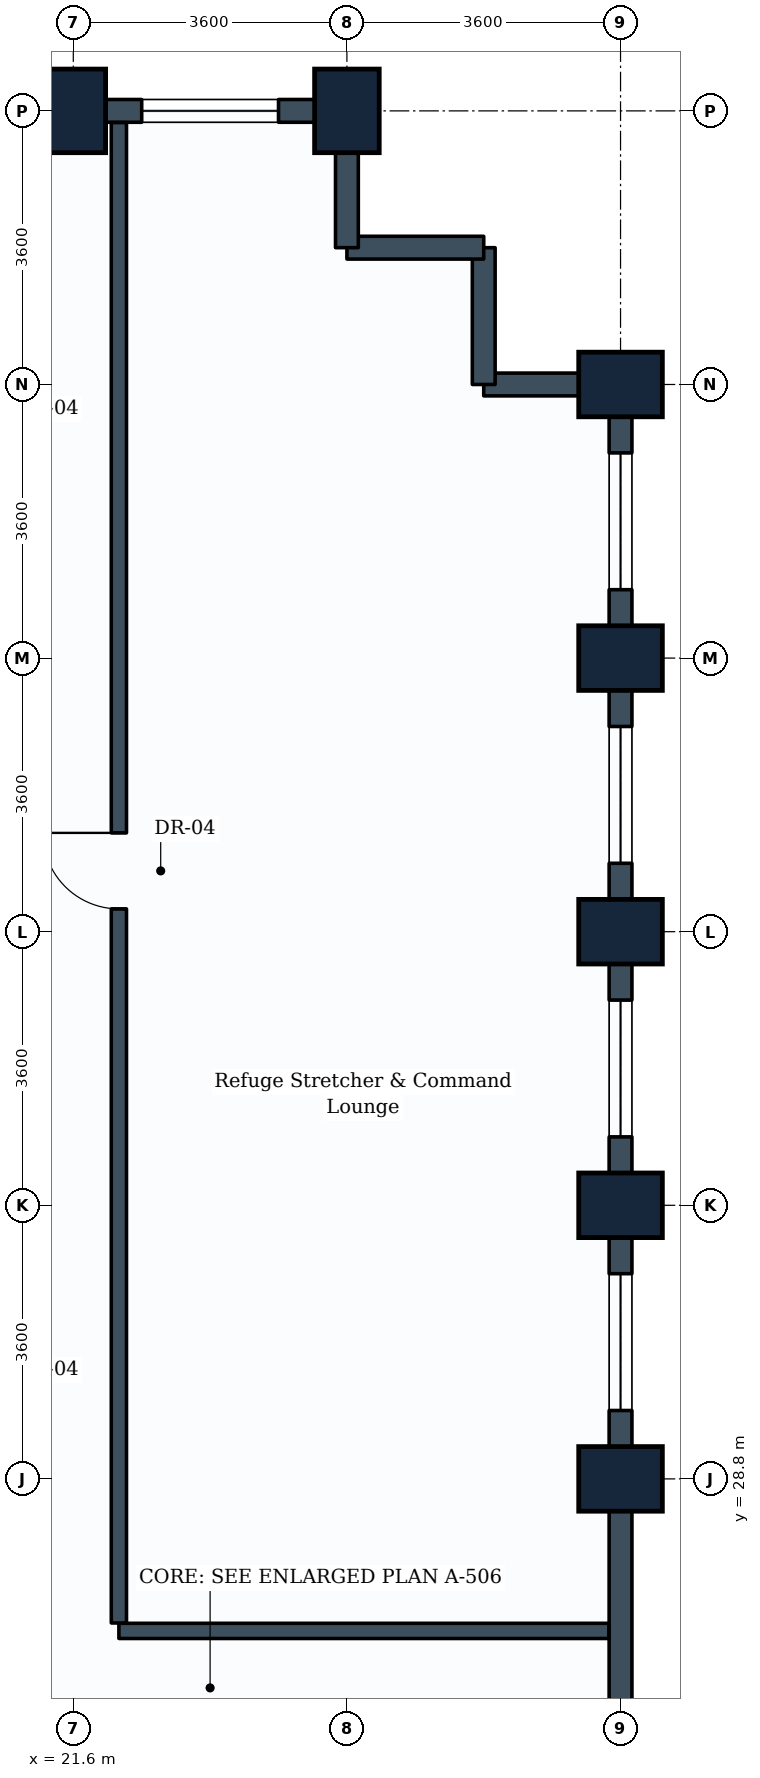
"""IFC4 building model, lengths in metres.
Left out: names, types, materials, properties, quantities, classifications, styles, units other than length and angle.
Written with IfcOpenShell. Run it as: python <this file> out.ifc"""

import sys

from ifc_helpers import new_model, si_unit, direction, frame, frame_2d, origin, origin_2d, place, context, subcontext, project, spatial, rectangle, extrude, element, fill, save


model = new_model("IFC4")
c1 = context("Model", 3, precision=1e-05, world=origin(), true_north=direction((0.0, 1.0)))
c2 = subcontext(c1, "Body", "Model", "MODEL_VIEW")
j1 = project(units=[si_unit("LENGTHUNIT", "METRE"), si_unit("PLANEANGLEUNIT", "RADIAN")], contexts=[c1])
p1 = place(None, origin())
s1 = spatial("IfcSite", under=j1, at=p1, CompositionType="ELEMENT")
p2 = place(p1, origin())
s2 = spatial("IfcBuilding", under=s1, at=p2, CompositionType="ELEMENT")
p3 = place(p2, frame((0.0, 0.0, 120.0)))
s3 = spatial("IfcBuildingStorey", under=s2, at=p3, CompositionType="ELEMENT", Elevation=120.0)
for number, where, z_axis, x_axis in (
    (1, (21.6, 46.8, 0.0), (0.0, 0.0, 1.0), (1.0, 0.0, 0.0)),
    (2, (25.2, 46.8, 0.0), (0.0, 0.0, 1.0), (1.0, 0.0, 0.0)),
    (3, (28.8, 28.8, 0.0), (0.0, 0.0, 1.0), (0.0, 1.0, 0.0)),
    (4, (28.8, 32.4, 0.0), (0.0, 0.0, 1.0), (0.0, 1.0, 0.0)),
    (5, (28.8, 36.0, 0.0), (0.0, 0.0, 1.0), (0.0, 1.0, 0.0)),
    (6, (28.8, 39.6, 0.0), (0.0, 0.0, 1.0), (0.0, 1.0, 0.0)),
    (7, (28.8, 43.2, 0.0), (0.0, 0.0, 1.0), (0.0, 1.0, 0.0)),
):
    element("IfcColumn", number, at=place(p3, frame(where, z_axis=z_axis, x_axis=x_axis)), inside=s3, PredefinedType="COLUMN", context=c2, shape_type="SweptSolid", body=[
        extrude(rectangle(XDim=0.85, YDim=1.1, at=origin_2d()), origin(), (0.0, 0.0, 1.0), 3.8),
    ])
p4 = place(p3, frame((28.8, 28.8, 0.0), z_axis=(0.0, 0.0, 1.0), x_axis=(0.0, -1.0, 0.0)))
e8 = element("IfcWall", 8, at=p4, inside=s3, PredefinedType="STANDARD", context=c2, shape_type="SweptSolid", body=[
    extrude(rectangle(XDim=3.6, YDim=0.3, at=frame_2d((1.8, 0.0))), origin(), (0.0, 0.0, 1.0), 3.09),
])
p5 = place(p3, frame((28.8, 32.4, 0.0), z_axis=(0.0, 0.0, 1.0), x_axis=(0.0, -1.0, 0.0)))
e9 = element("IfcWall", 9, at=p5, inside=s3, PredefinedType="STANDARD", context=c2, shape_type="SweptSolid", body=[
    extrude(rectangle(XDim=3.6, YDim=0.3, at=frame_2d((1.8, 0.0))), origin(), (0.0, 0.0, 1.0), 2.93),
])
p6 = place(p5, frame((0.9, 0.0, 0.85)))
e10 = element("IfcOpeningElement", 10, at=p6, cuts=e9, PredefinedType="OPENING", context=c2, shape_type="SweptSolid", body=[
    extrude(rectangle(XDim=1.8, YDim=1.35, at=frame_2d((0.9, 0.675))), frame((0.0, 0.16, 0.0), z_axis=(0.0, -1.0, 0.0), x_axis=(1.0, 0.0, 0.0)), (0.0, 0.0, 1.0), 0.32),
])
p7 = place(p3, frame((28.8, 36.0, 0.0), z_axis=(0.0, 0.0, 1.0), x_axis=(0.0, -1.0, 0.0)))
e11 = element("IfcWall", 11, at=p7, inside=s3, PredefinedType="STANDARD", context=c2, shape_type="SweptSolid", body=[
    extrude(rectangle(XDim=3.6, YDim=0.3, at=frame_2d((1.8, 0.0))), origin(), (0.0, 0.0, 1.0), 2.93),
])
p8 = place(p7, frame((0.9, 0.0, 0.85)))
e12 = element("IfcOpeningElement", 12, at=p8, cuts=e11, PredefinedType="OPENING", context=c2, shape_type="SweptSolid", body=[
    extrude(rectangle(XDim=1.8, YDim=1.35, at=frame_2d((0.9, 0.675))), frame((0.0, 0.16, 0.0), z_axis=(0.0, -1.0, 0.0), x_axis=(1.0, 0.0, 0.0)), (0.0, 0.0, 1.0), 0.32),
])
p9 = place(p3, frame((28.8, 39.6, 0.0), z_axis=(0.0, 0.0, 1.0), x_axis=(0.0, -1.0, 0.0)))
e13 = element("IfcWall", 13, at=p9, inside=s3, PredefinedType="STANDARD", context=c2, shape_type="SweptSolid", body=[
    extrude(rectangle(XDim=3.6, YDim=0.3, at=frame_2d((1.8, 0.0))), origin(), (0.0, 0.0, 1.0), 2.93),
])
p10 = place(p9, frame((0.9, 0.0, 0.85)))
e14 = element("IfcOpeningElement", 14, at=p10, cuts=e13, PredefinedType="OPENING", context=c2, shape_type="SweptSolid", body=[
    extrude(rectangle(XDim=1.8, YDim=1.35, at=frame_2d((0.9, 0.675))), frame((0.0, 0.16, 0.0), z_axis=(0.0, -1.0, 0.0), x_axis=(1.0, 0.0, 0.0)), (0.0, 0.0, 1.0), 0.32),
])
p11 = place(p3, frame((28.8, 43.2, 0.0), z_axis=(0.0, 0.0, 1.0), x_axis=(0.0, -1.0, 0.0)))
e15 = element("IfcWall", 15, at=p11, inside=s3, PredefinedType="STANDARD", context=c2, shape_type="SweptSolid", body=[
    extrude(rectangle(XDim=3.6, YDim=0.3, at=frame_2d((1.8, 0.0))), origin(), (0.0, 0.0, 1.0), 2.93),
])
p12 = place(p11, frame((0.9, 0.0, 0.85)))
e16 = element("IfcOpeningElement", 16, at=p12, cuts=e15, PredefinedType="OPENING", context=c2, shape_type="SweptSolid", body=[
    extrude(rectangle(XDim=1.8, YDim=1.35, at=frame_2d((0.9, 0.675))), frame((0.0, 0.16, 0.0), z_axis=(0.0, -1.0, 0.0), x_axis=(1.0, 0.0, 0.0)), (0.0, 0.0, 1.0), 0.32),
])
p13 = place(p3, frame((27.0, 43.2, 0.0), z_axis=(0.0, 0.0, 1.0), x_axis=(1.0, 0.0, 0.0)))
e17 = element("IfcWall", 17, at=p13, inside=s3, PredefinedType="STANDARD", context=c2, shape_type="SweptSolid", body=[
    extrude(rectangle(XDim=1.8, YDim=0.3, at=frame_2d((0.9, 0.0))), origin(), (0.0, 0.0, 1.0), 2.93),
])
for number, where, z_axis, x_axis in (
    (18, (27.0, 43.2, 0.0), (0.0, 0.0, 1.0), (0.0, 1.0, 0.0)),
    (19, (25.2, 45.0, 0.0), (0.0, 0.0, 1.0), (1.0, 0.0, 0.0)),
):
    element("IfcWall", number, at=place(p3, frame(where, z_axis=z_axis, x_axis=x_axis)), inside=s3, PredefinedType="STANDARD", context=c2, shape_type="SweptSolid", body=[
        extrude(rectangle(XDim=1.8, YDim=0.3, at=frame_2d((0.9, 0.0))), origin(), (0.0, 0.0, 1.0), 3.535),
    ])
p14 = place(p3, frame((25.2, 45.0, 0.0), z_axis=(0.0, 0.0, 1.0), x_axis=(0.0, 1.0, 0.0)))
e20 = element("IfcWall", 20, at=p14, inside=s3, PredefinedType="STANDARD", context=c2, shape_type="SweptSolid", body=[
    extrude(rectangle(XDim=1.8, YDim=0.3, at=frame_2d((0.9, 0.0))), origin(), (0.0, 0.0, 1.0), 2.93),
])
p15 = place(p3, frame((21.6, 46.8, 0.0), z_axis=(0.0, 0.0, 1.0), x_axis=(1.0, 0.0, 0.0)))
e21 = element("IfcWall", 21, at=p15, inside=s3, PredefinedType="STANDARD", context=c2, shape_type="SweptSolid", body=[
    extrude(rectangle(XDim=3.6, YDim=0.3, at=frame_2d((1.8, 0.0))), origin(), (0.0, 0.0, 1.0), 2.93),
])
p16 = place(p15, frame((0.9, 0.0, 0.85)))
e22 = element("IfcOpeningElement", 22, at=p16, cuts=e21, PredefinedType="OPENING", context=c2, shape_type="SweptSolid", body=[
    extrude(rectangle(XDim=1.8, YDim=1.35, at=frame_2d((0.9, 0.675))), frame((0.0, 0.16, 0.0), z_axis=(0.0, -1.0, 0.0), x_axis=(1.0, 0.0, 0.0)), (0.0, 0.0, 1.0), 0.32),
])
p17 = place(p3, frame((18.0, 46.8, 0.0), z_axis=(0.0, 0.0, 1.0), x_axis=(1.0, 0.0, 0.0)))
e23 = element("IfcWall", 23, at=p17, inside=s3, PredefinedType="STANDARD", context=c2, shape_type="SweptSolid", body=[
    extrude(rectangle(XDim=3.6, YDim=0.3, at=frame_2d((1.8, 0.0))), origin(), (0.0, 0.0, 1.0), 2.93),
])
p18 = place(p3, frame((22.2, 26.8, 0.0), z_axis=(0.0, 0.0, 1.0), x_axis=(1.0, 0.0, 0.0)))
e24 = element("IfcWall", 24, at=p18, inside=s3, PredefinedType="PARTITIONING", context=c2, shape_type="SweptSolid", body=[
    extrude(rectangle(XDim=6.446, YDim=0.2, at=frame_2d((3.223, 0.0))), origin(), (0.0, 0.0, 1.0), 3.535),
])
p19 = place(p3, frame((22.2, 26.904, 0.0), z_axis=(0.0, 0.0, 1.0), x_axis=(0.0, 1.0, 0.0)))
e25 = element("IfcWall", 25, at=p19, inside=s3, PredefinedType="PARTITIONING", context=c2, shape_type="SweptSolid", body=[
    extrude(rectangle(XDim=19.742, YDim=0.2, at=frame_2d((9.871, 0.0))), origin(), (0.0, 0.0, 1.0), 2.93),
])
p20 = place(p19, frame((9.396, 0.0, 0.0)))
e26 = element("IfcOpeningElement", 26, at=p20, cuts=e25, PredefinedType="OPENING", context=c2, shape_type="SweptSolid", body=[
    extrude(rectangle(XDim=1.0, YDim=2.1, at=frame_2d((0.5, 1.05))), frame((0.0, 0.11, 0.0), z_axis=(0.0, -1.0, 0.0), x_axis=(1.0, 0.0, 0.0)), (0.0, 0.0, 1.0), 0.22),
])
p21 = place(p6, origin())
e27 = element("IfcWindow", 27, at=p21, inside=s3, PartitioningType="SINGLE_PANEL", PredefinedType="WINDOW", context=c2, shape_type="SweptSolid", body=[
    extrude(rectangle(XDim=1.8, YDim=1.35, at=frame_2d((0.9, 0.675))), frame((0.0, 0.03, 0.0), z_axis=(0.0, -1.0, 0.0), x_axis=(1.0, 0.0, 0.0)), (0.0, 0.0, 1.0), 0.06),
])
fill(e10, e27)
p22 = place(p8, origin())
e28 = element("IfcWindow", 28, at=p22, inside=s3, PartitioningType="SINGLE_PANEL", PredefinedType="WINDOW", context=c2, shape_type="SweptSolid", body=[
    extrude(rectangle(XDim=1.8, YDim=1.35, at=frame_2d((0.9, 0.675))), frame((0.0, 0.03, 0.0), z_axis=(0.0, -1.0, 0.0), x_axis=(1.0, 0.0, 0.0)), (0.0, 0.0, 1.0), 0.06),
])
fill(e12, e28)
p23 = place(p10, origin())
e29 = element("IfcWindow", 29, at=p23, inside=s3, PartitioningType="SINGLE_PANEL", PredefinedType="WINDOW", context=c2, shape_type="SweptSolid", body=[
    extrude(rectangle(XDim=1.8, YDim=1.35, at=frame_2d((0.9, 0.675))), frame((0.0, 0.03, 0.0), z_axis=(0.0, -1.0, 0.0), x_axis=(1.0, 0.0, 0.0)), (0.0, 0.0, 1.0), 0.06),
])
fill(e14, e29)
p24 = place(p12, origin())
e30 = element("IfcWindow", 30, at=p24, inside=s3, PartitioningType="SINGLE_PANEL", PredefinedType="WINDOW", context=c2, shape_type="SweptSolid", body=[
    extrude(rectangle(XDim=1.8, YDim=1.35, at=frame_2d((0.9, 0.675))), frame((0.0, 0.03, 0.0), z_axis=(0.0, -1.0, 0.0), x_axis=(1.0, 0.0, 0.0)), (0.0, 0.0, 1.0), 0.06),
])
fill(e16, e30)
p25 = place(p16, origin())
e31 = element("IfcWindow", 31, at=p25, inside=s3, PartitioningType="SINGLE_PANEL", PredefinedType="WINDOW", context=c2, shape_type="SweptSolid", body=[
    extrude(rectangle(XDim=1.8, YDim=1.35, at=frame_2d((0.9, 0.675))), frame((0.0, 0.03, 0.0), z_axis=(0.0, -1.0, 0.0), x_axis=(1.0, 0.0, 0.0)), (0.0, 0.0, 1.0), 0.06),
])
fill(e22, e31)
p26 = place(p20, origin())
e32 = element("IfcDoor", 32, at=p26, inside=s3, OperationType="SINGLE_SWING_RIGHT", PredefinedType="DOOR", context=c2, shape_type="SweptSolid", body=[
    extrude(rectangle(XDim=1.0, YDim=2.1, at=frame_2d((0.5, 1.05))), frame((0.0, 0.025, 0.0), z_axis=(0.0, -1.0, 0.0), x_axis=(1.0, 0.0, 0.0)), (0.0, 0.0, 1.0), 0.05),
])
fill(e26, e32)
save(model, sys.argv[1])
